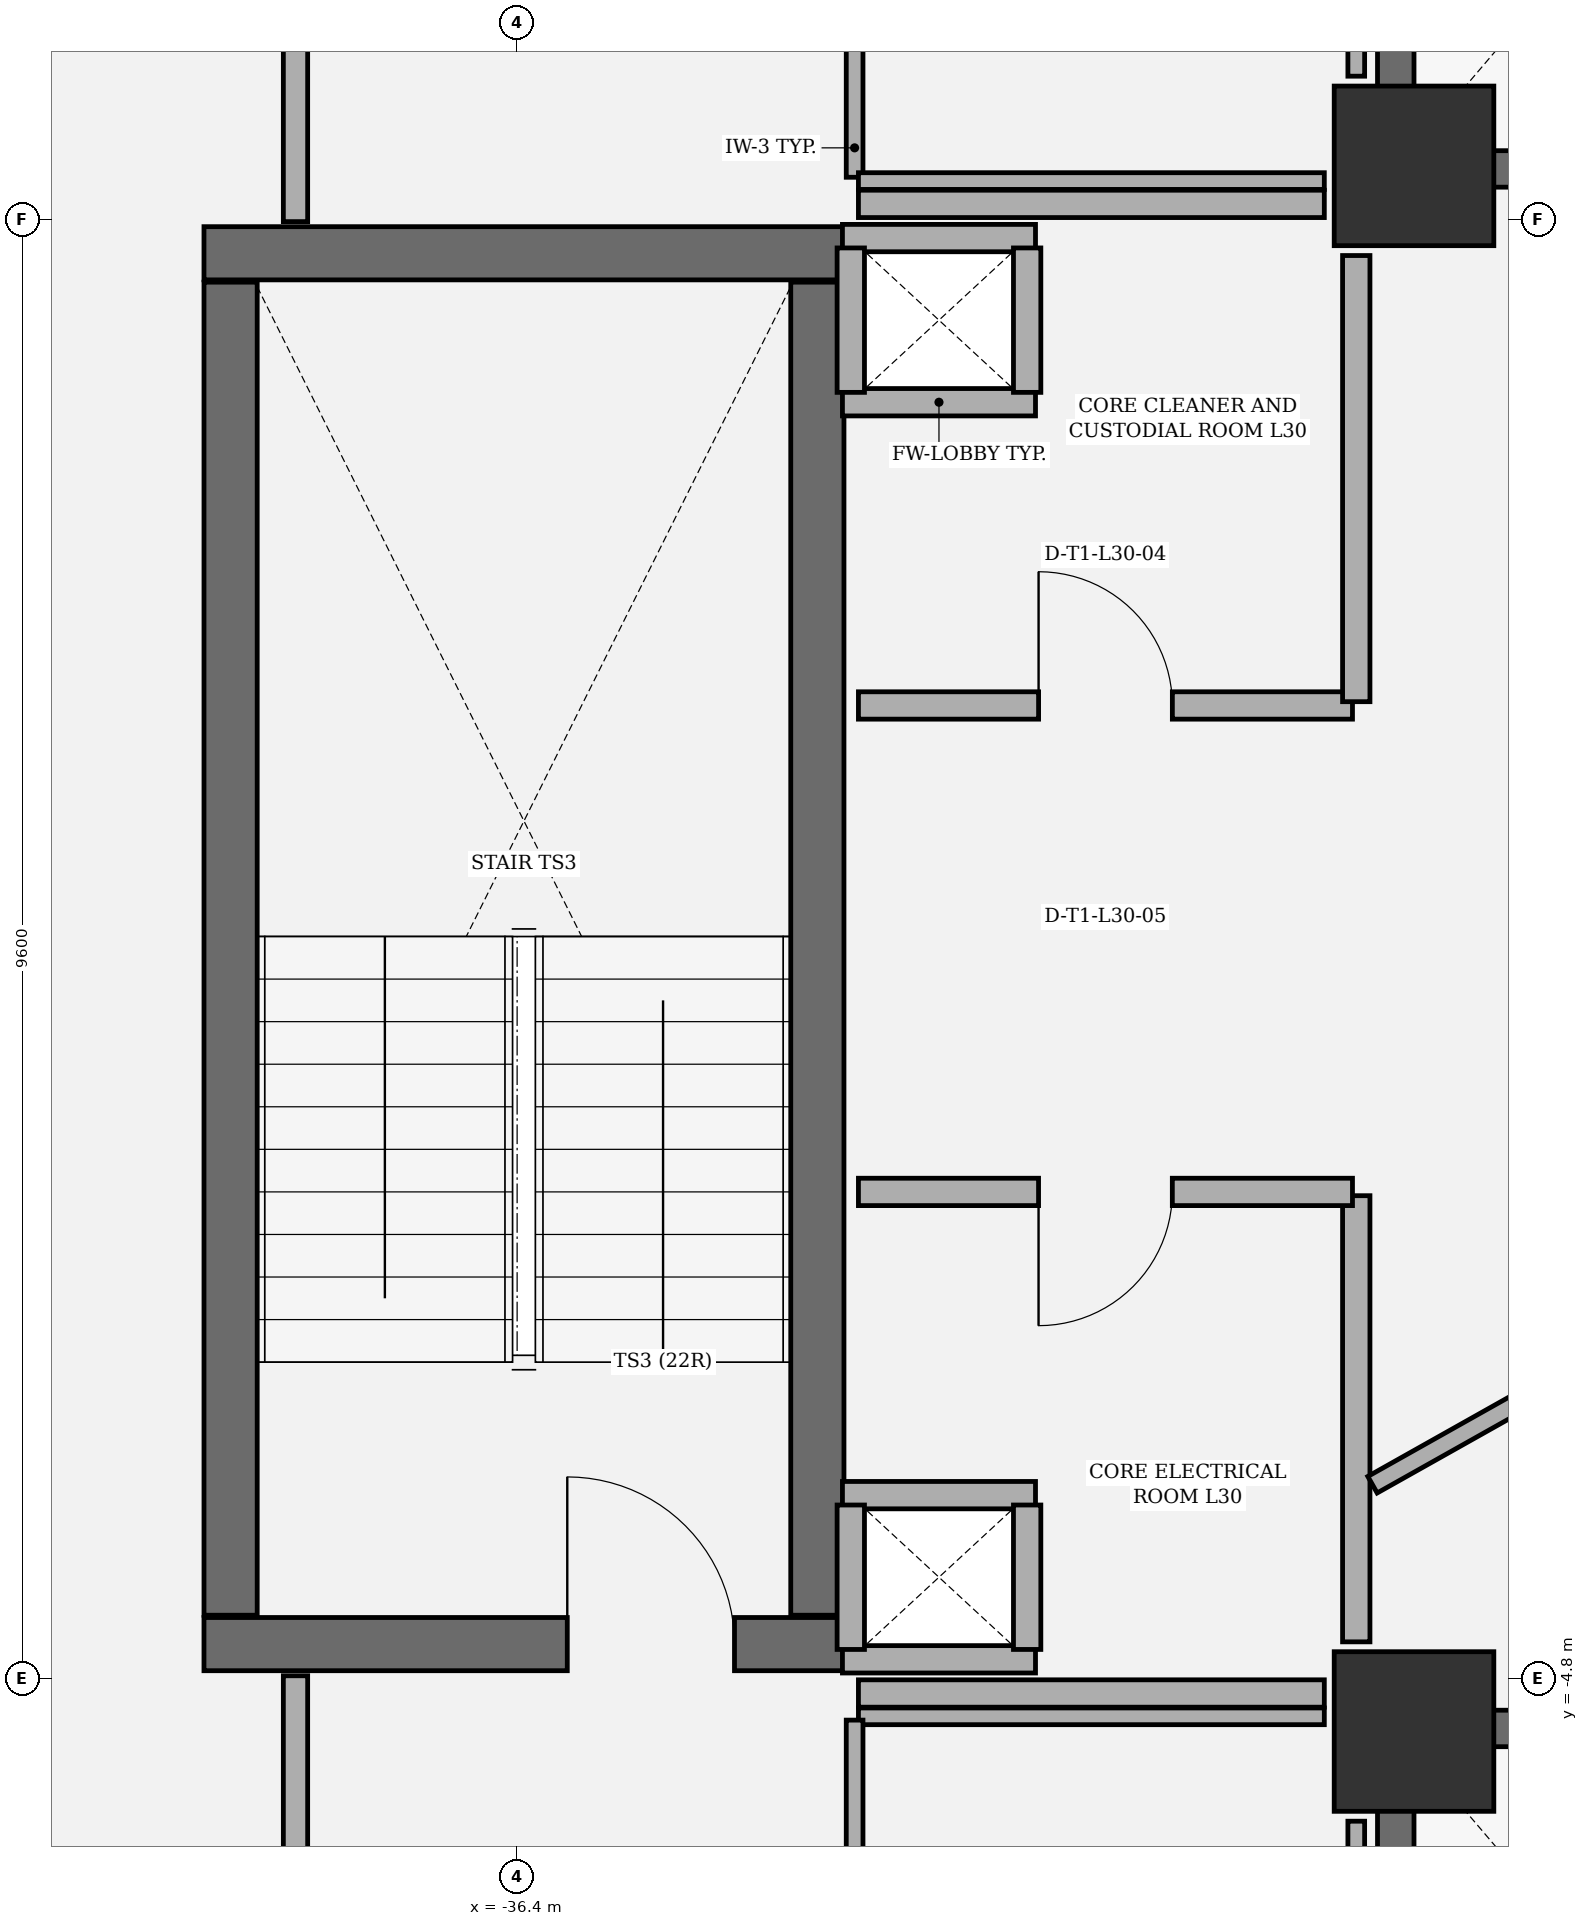
"""IFC4 building model, lengths in metres.
Left out: names, types, materials, properties, quantities, classifications, styles, units other than length and angle.
Written with IfcOpenShell. Run it as: python <this file> out.ifc"""

import sys

from ifc_helpers import new_model, si_unit, direction, frame, frame_2d, origin, origin_2d, place, context, subcontext, project, spatial, rectangle, extrude, element, fill, save


model = new_model("IFC4")
c1 = context("Model", 3, precision=1e-05, world=origin(), true_north=direction((0.0, 1.0)))
c2 = subcontext(c1, "Body", "Model", "MODEL_VIEW")
j1 = project(units=[si_unit("LENGTHUNIT", "METRE"), si_unit("PLANEANGLEUNIT", "RADIAN")], contexts=[c1])
p1 = place(None, origin())
s1 = spatial("IfcSite", under=j1, at=p1, CompositionType="ELEMENT")
p2 = place(p1, origin())
s2 = spatial("IfcBuilding", under=s1, at=p2, CompositionType="ELEMENT")
p3 = place(p2, frame((0.0, 0.0, 134.1)))
s3 = spatial("IfcBuildingStorey", under=s2, at=p3, CompositionType="ELEMENT", Elevation=134.1)
for number, where, z_axis, x_axis in (
    (1, (-30.5, 5.15, 0.0), (0.0, 0.0, 1.0), (1.0, 0.0, 0.0)),
    (2, (-30.5, -5.15, 0.0), (0.0, 0.0, 1.0), (1.0, 0.0, 0.0)),
):
    element("IfcColumn", number, at=place(p3, frame(where, z_axis=z_axis, x_axis=x_axis)), inside=s3, PredefinedType="COLUMN", context=c2, shape_type="SweptSolid", body=[
        extrude(rectangle(XDim=1.05, YDim=1.05, at=origin_2d()), origin(), (0.0, 0.0, 1.0), 4.05),
    ])
p4 = place(p3, frame((-38.46, -4.575, 0.0), z_axis=(0.0, 0.0, 1.0), x_axis=(1.0, 0.0, 0.0)))
e3 = element("IfcWall", 3, at=p4, inside=s3, PredefinedType="SHEAR", context=c2, shape_type="SweptSolid", body=[
    extrude(rectangle(XDim=4.21, YDim=0.35, at=frame_2d((2.105, 0.0))), origin(), (0.0, 0.0, 1.0), 3.78),
])
p5 = place(p4, frame((2.39, 0.0, 0.0)))
e4 = element("IfcOpeningElement", 4, at=p5, cuts=e3, PredefinedType="OPENING", context=c2, shape_type="SweptSolid", body=[
    extrude(rectangle(XDim=1.1, YDim=2.2, at=frame_2d((0.55, 1.1))), frame((0.0, 0.185, 0.0), z_axis=(0.0, -1.0, 0.0), x_axis=(1.0, 0.0, 0.0)), (0.0, 0.0, 1.0), 0.37),
])
p6 = place(p3, frame((-34.25, 4.575, 0.0), z_axis=(0.0, 0.0, 1.0), x_axis=(-1.0, 0.0, 0.0)))
e5 = element("IfcWall", 5, at=p6, inside=s3, PredefinedType="SHEAR", context=c2, shape_type="SweptSolid", body=[
    extrude(rectangle(XDim=4.21, YDim=0.35, at=frame_2d((2.105, 0.0))), origin(), (0.0, 0.0, 1.0), 3.78),
])
for number, where, z_axis, x_axis in (
    (6, (-34.425, -4.385, 0.0), (0.0, 0.0, 1.0), (0.0, 1.0, 0.0)),
    (7, (-38.285, 4.385, 0.0), (0.0, 0.0, 1.0), (0.0, -1.0, 0.0)),
):
    element("IfcWall", number, at=place(p3, frame(where, z_axis=z_axis, x_axis=x_axis)), inside=s3, PredefinedType="SHEAR", context=c2, shape_type="SweptSolid", body=[
        extrude(rectangle(XDim=8.77, YDim=0.35, at=frame_2d((4.385, 0.0))), origin(), (0.0, 0.0, 1.0), 3.78),
    ])
p7 = place(p3, frame((-28.26, 5.13, 0.0), z_axis=(0.0, 0.0, 1.0), x_axis=(-1.0, 0.0, 0.0)))
e8 = element("IfcWall", 8, at=p7, inside=s3, PredefinedType="SHEAR", context=c2, shape_type="SweptSolid", body=[
    extrude(rectangle(XDim=2.48, YDim=0.24, at=frame_2d((1.24, 0.0))), origin(), (0.0, 0.0, 1.0), 3.78),
])
p8 = place(p3, frame((-30.62, 5.262, 0.0), z_axis=(0.0, 0.0, 1.0), x_axis=(0.0, 1.0, 0.0)))
e9 = element("IfcWall", 9, at=p8, inside=s3, PredefinedType="SHEAR", context=c2, shape_type="SweptSolid", body=[
    extrude(rectangle(XDim=2.376, YDim=0.24, at=frame_2d((1.188, 0.0))), origin(), (0.0, 0.0, 1.0), 3.78),
])
p9 = place(p3, frame((-30.74, -5.13, 0.0), z_axis=(0.0, 0.0, 1.0), x_axis=(1.0, 0.0, 0.0)))
e10 = element("IfcWall", 10, at=p9, inside=s3, PredefinedType="SHEAR", context=c2, shape_type="SweptSolid", body=[
    extrude(rectangle(XDim=2.48, YDim=0.24, at=frame_2d((1.24, 0.0))), origin(), (0.0, 0.0, 1.0), 3.78),
])
p10 = place(p3, frame((-30.62, -7.638, 0.0), z_axis=(0.0, 0.0, 1.0), x_axis=(0.0, 1.0, 0.0)))
e11 = element("IfcWall", 11, at=p10, inside=s3, PredefinedType="SHEAR", context=c2, shape_type="SweptSolid", body=[
    extrude(rectangle(XDim=2.376, YDim=0.24, at=frame_2d((1.188, 0.0))), origin(), (0.0, 0.0, 1.0), 3.78),
])
for number, where, z_axis, x_axis in (
    (12, (-32.99, 3.595, 0.0), (0.0, 0.0, 1.0), (-1.0, 0.0, 0.0)),
    (13, (-34.26, 4.675, 0.0), (0.0, 0.0, 1.0), (1.0, 0.0, 0.0)),
):
    element("IfcWall", number, at=place(p3, frame(where, z_axis=z_axis, x_axis=x_axis)), inside=s3, PredefinedType="PARTITIONING", context=c2, shape_type="SweptSolid", body=[
        extrude(rectangle(XDim=1.27, YDim=0.18, at=frame_2d((0.635, 0.0))), origin(), (0.0, 0.0, 1.0), 3.78),
    ])
for number, where, z_axis, x_axis in (
    (14, (-34.205, 3.66, 0.0), (0.0, 0.0, 1.0), (0.0, 1.0, 0.0)),
    (15, (-33.045, 4.61, 0.0), (0.0, 0.0, 1.0), (0.0, -1.0, 0.0)),
):
    element("IfcWall", number, at=place(p3, frame(where, z_axis=z_axis, x_axis=x_axis)), inside=s3, PredefinedType="PARTITIONING", context=c2, shape_type="SweptSolid", body=[
        extrude(rectangle(XDim=0.95, YDim=0.18, at=frame_2d((0.475, 0.0))), origin(), (0.0, 0.0, 1.0), 3.78),
    ])
for number, where, z_axis, x_axis in (
    (16, (-32.99, -4.675, 0.0), (0.0, 0.0, 1.0), (-1.0, 0.0, 0.0)),
    (17, (-34.26, -3.595, 0.0), (0.0, 0.0, 1.0), (1.0, 0.0, 0.0)),
):
    element("IfcWall", number, at=place(p3, frame(where, z_axis=z_axis, x_axis=x_axis)), inside=s3, PredefinedType="PARTITIONING", context=c2, shape_type="SweptSolid", body=[
        extrude(rectangle(XDim=1.27, YDim=0.18, at=frame_2d((0.635, 0.0))), origin(), (0.0, 0.0, 1.0), 3.78),
    ])
for number, where, z_axis, x_axis in (
    (18, (-34.205, -4.61, 0.0), (0.0, 0.0, 1.0), (0.0, 1.0, 0.0)),
    (19, (-33.045, -3.66, 0.0), (0.0, 0.0, 1.0), (0.0, -1.0, 0.0)),
):
    element("IfcWall", number, at=place(p3, frame(where, z_axis=z_axis, x_axis=x_axis)), inside=s3, PredefinedType="PARTITIONING", context=c2, shape_type="SweptSolid", body=[
        extrude(rectangle(XDim=0.95, YDim=0.18, at=frame_2d((0.475, 0.0))), origin(), (0.0, 0.0, 1.0), 3.78),
    ])
p11 = place(p3, frame((-34.18, 8.225, 0.0), z_axis=(0.0, 0.0, 1.0), x_axis=(0.0, -1.0, 0.0)))
e20 = element("IfcWall", 20, at=p11, inside=s3, PredefinedType="PARTITIONING", context=c2, shape_type="SweptSolid", body=[
    extrude(rectangle(XDim=3.15, YDim=0.11, at=frame_2d((1.575, 0.0))), origin(), (0.0, 0.0, 1.0), 3.78),
])
p12 = place(p11, frame((1.135, 0.0, 0.0)))
e21 = element("IfcOpeningElement", 21, at=p12, cuts=e20, PredefinedType="OPENING", context=c2, shape_type="SweptSolid", body=[
    extrude(rectangle(XDim=0.88, YDim=2.1, at=frame_2d((0.44, 1.05))), frame((0.0, 0.065, 0.0), z_axis=(0.0, -1.0, 0.0), x_axis=(1.0, 0.0, 0.0)), (0.0, 0.0, 1.0), 0.13),
])
p13 = place(p3, frame((-34.155, 5.05, 0.0), z_axis=(0.0, 0.0, 1.0), x_axis=(1.0, 0.0, 0.0)))
e22 = element("IfcWall", 22, at=p13, inside=s3, PredefinedType="PARTITIONING", context=c2, shape_type="SweptSolid", body=[
    extrude(rectangle(XDim=3.065, YDim=0.11, at=frame_2d((1.532, 0.0))), origin(), (0.0, 0.0, 1.0), 3.78),
])
for number, where, z_axis, x_axis in (
    (23, (-30.88, 5.74, 0.0), (0.0, 0.0, 1.0), (0.0, 1.0, 0.0)),
    (24, (-30.88, -7.743, 0.0), (0.0, 0.0, 1.0), (0.0, 1.0, 0.0)),
):
    element("IfcWall", number, at=place(p3, frame(where, z_axis=z_axis, x_axis=x_axis)), inside=s3, PredefinedType="PARTITIONING", context=c2, shape_type="SweptSolid", body=[
        extrude(rectangle(XDim=2.003, YDim=0.11, at=frame_2d((1.001, 0.0))), origin(), (0.0, 0.0, 1.0), 3.78),
    ])
p14 = place(p3, frame((-31.09, -5.05, 0.0), z_axis=(0.0, 0.0, 1.0), x_axis=(-1.0, 0.0, 0.0)))
e25 = element("IfcWall", 25, at=p14, inside=s3, PredefinedType="PARTITIONING", context=c2, shape_type="SweptSolid", body=[
    extrude(rectangle(XDim=3.065, YDim=0.11, at=frame_2d((1.532, 0.0))), origin(), (0.0, 0.0, 1.0), 3.78),
])
p15 = place(p3, frame((-34.18, -5.075, 0.0), z_axis=(0.0, 0.0, 1.0), x_axis=(0.0, -1.0, 0.0)))
e26 = element("IfcWall", 26, at=p15, inside=s3, PredefinedType="PARTITIONING", context=c2, shape_type="SweptSolid", body=[
    extrude(rectangle(XDim=3.25, YDim=0.11, at=frame_2d((1.625, 0.0))), origin(), (0.0, 0.0, 1.0), 3.78),
])
p16 = place(p15, frame((1.185, 0.0, 0.0)))
e27 = element("IfcOpeningElement", 27, at=p16, cuts=e26, PredefinedType="OPENING", context=c2, shape_type="SweptSolid", body=[
    extrude(rectangle(XDim=0.88, YDim=2.1, at=frame_2d((0.44, 1.05))), frame((0.0, 0.065, 0.0), z_axis=(0.0, -1.0, 0.0), x_axis=(1.0, 0.0, 0.0)), (0.0, 0.0, 1.0), 0.13),
])
p17 = place(p3, frame((-34.155, 1.6, 0.0), z_axis=(0.0, 0.0, 1.0), x_axis=(1.0, 0.0, 0.0)))
e28 = element("IfcWall", 28, at=p17, inside=s3, PredefinedType="PARTITIONING", context=c2, shape_type="SweptSolid", body=[
    extrude(rectangle(XDim=3.25, YDim=0.18, at=frame_2d((1.625, 0.0))), origin(), (0.0, 0.0, 1.0), 3.78),
])
p18 = place(p17, frame((1.185, 0.0, 0.0)))
e29 = element("IfcOpeningElement", 29, at=p18, cuts=e28, PredefinedType="OPENING", context=c2, shape_type="SweptSolid", body=[
    extrude(rectangle(XDim=0.88, YDim=2.1, at=frame_2d((0.44, 1.05))), frame((0.0, 0.1, 0.0), z_axis=(0.0, -1.0, 0.0), x_axis=(1.0, 0.0, 0.0)), (0.0, 0.0, 1.0), 0.2),
])
p19 = place(p3, frame((-30.88, 1.625, 0.0), z_axis=(0.0, 0.0, 1.0), x_axis=(0.0, 1.0, 0.0)))
e30 = element("IfcWall", 30, at=p19, inside=s3, PredefinedType="PARTITIONING", context=c2, shape_type="SweptSolid", body=[
    extrude(rectangle(XDim=2.935, YDim=0.18, at=frame_2d((1.468, 0.0))), origin(), (0.0, 0.0, 1.0), 3.78),
])
for number, where, z_axis, x_axis in (
    (31, (-31.09, 4.9, 0.0), (0.0, 0.0, 1.0), (-1.0, 0.0, 0.0)),
    (32, (-34.155, -4.9, 0.0), (0.0, 0.0, 1.0), (1.0, 0.0, 0.0)),
):
    element("IfcWall", number, at=place(p3, frame(where, z_axis=z_axis, x_axis=x_axis)), inside=s3, PredefinedType="PARTITIONING", context=c2, shape_type="SweptSolid", body=[
        extrude(rectangle(XDim=3.065, YDim=0.18, at=frame_2d((1.532, 0.0))), origin(), (0.0, 0.0, 1.0), 3.78),
    ])
p20 = place(p3, frame((-30.88, -4.56, 0.0), z_axis=(0.0, 0.0, 1.0), x_axis=(0.0, 1.0, 0.0)))
e33 = element("IfcWall", 33, at=p20, inside=s3, PredefinedType="PARTITIONING", context=c2, shape_type="SweptSolid", body=[
    extrude(rectangle(XDim=2.935, YDim=0.18, at=frame_2d((1.468, 0.0))), origin(), (0.0, 0.0, 1.0), 3.78),
])
p21 = place(p3, frame((-30.905, -1.6, 0.0), z_axis=(0.0, 0.0, 1.0), x_axis=(-1.0, 0.0, 0.0)))
e34 = element("IfcWall", 34, at=p21, inside=s3, PredefinedType="PARTITIONING", context=c2, shape_type="SweptSolid", body=[
    extrude(rectangle(XDim=3.25, YDim=0.18, at=frame_2d((1.625, 0.0))), origin(), (0.0, 0.0, 1.0), 3.78),
])
p22 = place(p21, frame((1.185, 0.0, 0.0)))
e35 = element("IfcOpeningElement", 35, at=p22, cuts=e34, PredefinedType="OPENING", context=c2, shape_type="SweptSolid", body=[
    extrude(rectangle(XDim=0.88, YDim=2.1, at=frame_2d((0.44, 1.05))), frame((0.0, 0.1, 0.0), z_axis=(0.0, -1.0, 0.0), x_axis=(1.0, 0.0, 0.0)), (0.0, 0.0, 1.0), 0.2),
])
p23 = place(p3, frame((-37.858, -7.484, 0.0), z_axis=(0.0, 0.0, 1.0), x_axis=(0.0, 1.0, 0.0)))
e36 = element("IfcWall", 36, at=p23, inside=s3, PredefinedType="PARTITIONING", context=c2, shape_type="SweptSolid", body=[
    extrude(rectangle(XDim=2.701, YDim=0.16, at=frame_2d((1.35, 0.0))), origin(), (0.0, 0.0, 1.0), 3.78),
])
p24 = place(p3, frame((-37.858, 4.783, 0.0), z_axis=(0.0, 0.0, 1.0), x_axis=(0.0, 1.0, 0.0)))
e37 = element("IfcWall", 37, at=p24, inside=s3, PredefinedType="PARTITIONING", context=c2, shape_type="SweptSolid", body=[
    extrude(rectangle(XDim=5.95, YDim=0.16, at=frame_2d((2.975, 0.0))), origin(), (0.0, 0.0, 1.0), 3.78),
])
p25 = place(p3, frame((-28.732, -2.379, 0.0), z_axis=(0.0, 0.0, 1.0), x_axis=(-0.871711937641, -0.490018670842, 0.0)))
e38 = element("IfcWall", 38, at=p25, inside=s3, PredefinedType="PARTITIONING", context=c2, shape_type="SweptSolid", body=[
    extrude(rectangle(XDim=2.342, YDim=0.125, at=frame_2d((1.171, 0.0))), origin(), (0.0, 0.0, 1.0), 3.78),
])
p26 = place(p5, origin())
e39 = element("IfcDoor", 39, at=p26, inside=s3, OperationType="SINGLE_SWING_LEFT", PredefinedType="DOOR", context=c2, shape_type="SweptSolid", body=[
    extrude(rectangle(XDim=1.1, YDim=2.2, at=frame_2d((0.55, 1.1))), frame((0.0, 0.025, 0.0), z_axis=(0.0, -1.0, 0.0), x_axis=(1.0, 0.0, 0.0)), (0.0, 0.0, 1.0), 0.05),
])
fill(e4, e39)
p27 = place(p18, origin())
e40 = element("IfcDoor", 40, at=p27, inside=s3, OperationType="SINGLE_SWING_LEFT", PredefinedType="DOOR", context=c2, shape_type="SweptSolid", body=[
    extrude(rectangle(XDim=0.88, YDim=2.1, at=frame_2d((0.44, 1.05))), frame((0.0, 0.025, 0.0), z_axis=(0.0, -1.0, 0.0), x_axis=(1.0, 0.0, 0.0)), (0.0, 0.0, 1.0), 0.05),
])
fill(e29, e40)
p28 = place(p22, origin())
e41 = element("IfcDoor", 41, at=p28, inside=s3, OperationType="SINGLE_SWING_RIGHT", PredefinedType="DOOR", context=c2, shape_type="SweptSolid", body=[
    extrude(rectangle(XDim=0.88, YDim=2.1, at=frame_2d((0.44, 1.05))), frame((0.0, 0.025, 0.0), z_axis=(0.0, -1.0, 0.0), x_axis=(1.0, 0.0, 0.0)), (0.0, 0.0, 1.0), 0.05),
])
fill(e35, e41)
save(model, sys.argv[1])
